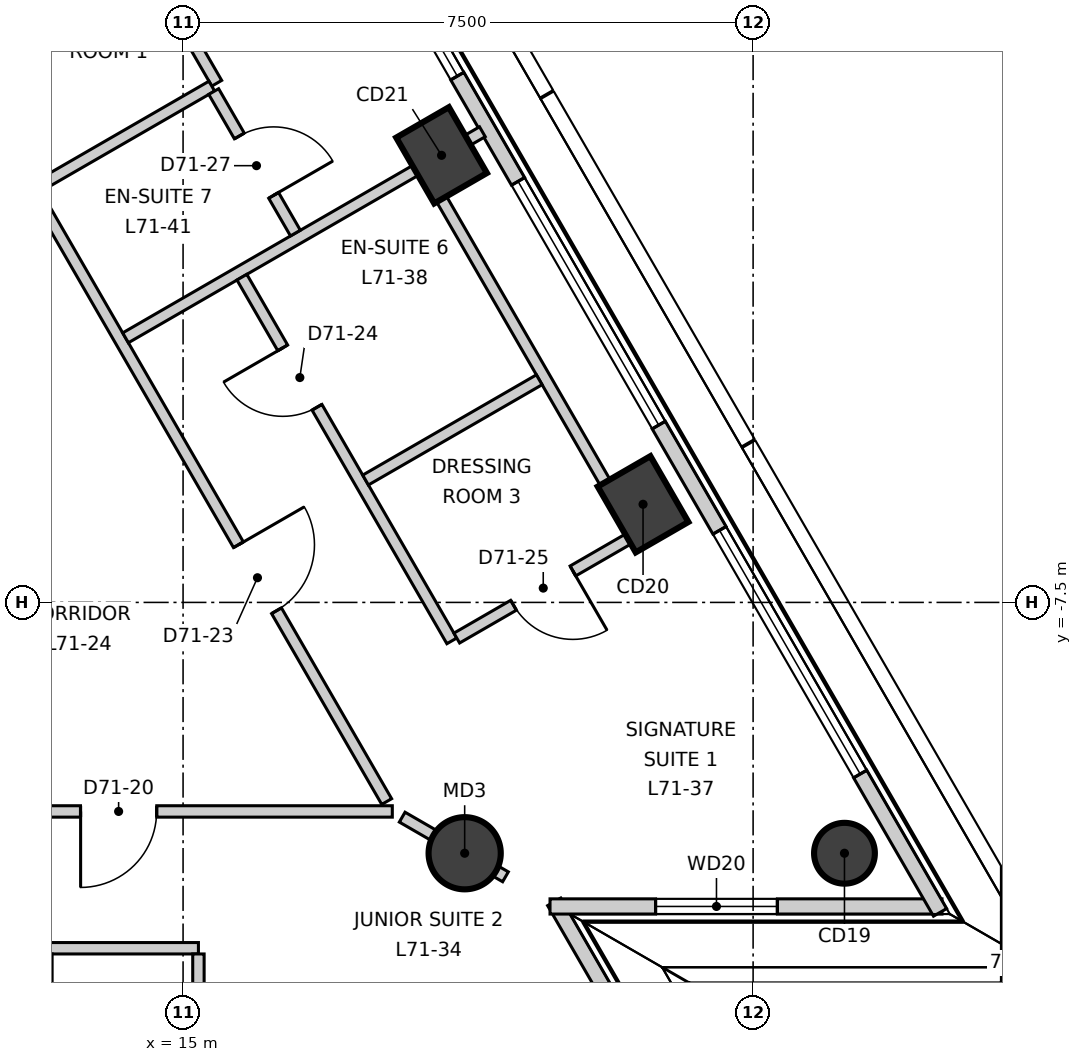
"""IFC4 building model, lengths in metres.
Left out: names, types, materials, properties, quantities, classifications, styles, units other than length and angle.
Written with IfcOpenShell. Run it as: python <this file> out.ifc"""

import sys

from ifc_helpers import new_model, si_unit, direction, frame, frame_2d, origin, origin_2d, place, context, subcontext, project, spatial, rectangle, circle, extrude, element, fill, save


model = new_model("IFC4")
c1 = context("Model", 3, precision=1e-05, world=origin(), true_north=direction((0.0, 1.0)))
c2 = subcontext(c1, "Body", "Model", "MODEL_VIEW")
j1 = project(units=[si_unit("LENGTHUNIT", "METRE"), si_unit("PLANEANGLEUNIT", "RADIAN")], contexts=[c1])
p1 = place(None, origin())
s1 = spatial("IfcSite", under=j1, at=p1, CompositionType="ELEMENT")
p2 = place(p1, origin())
s2 = spatial("IfcBuilding", under=s1, at=p2, CompositionType="ELEMENT")
p3 = place(p2, frame((0.0, 0.0, 300.7)))
s3 = spatial("IfcBuildingStorey", under=s2, at=p3, CompositionType="ELEMENT", Elevation=300.7)
p4 = place(p3, frame((23.702, -10.8, -0.3), z_axis=(0.0, 0.0, 1.0), x_axis=(-0.5, 0.866025403784, 0.0)))
e1 = element("IfcColumn", 1, at=p4, inside=s3, PredefinedType="COLUMN", context=c2, shape_type="SweptSolid", body=[
    extrude(circle(Radius=0.4, at=origin_2d()), origin(), (0.0, 0.0, 1.0), 3.6),
])
for number, where, z_axis, x_axis in (
    (2, (21.052, -6.209, -0.3), (0.0, 0.0, 1.0), (-0.5, 0.866, 0.0)),
    (3, (18.401, -1.618, -0.3), (0.0, 0.0, 1.0), (-0.5, 0.866, 0.0)),
):
    element("IfcColumn", number, at=place(p3, frame(where, z_axis=z_axis, x_axis=x_axis)), inside=s3, PredefinedType="COLUMN", context=c2, shape_type="SweptSolid", body=[
        extrude(rectangle(XDim=1.0, YDim=0.8, at=origin_2d()), origin(), (0.0, 0.0, 1.0), 3.6),
    ])
p5 = place(p3, frame((18.705, -10.8, -0.3), z_axis=(0.0, 0.0, 1.0), x_axis=(1.0, 0.0, 0.0)))
e4 = element("IfcColumn", 4, at=p5, inside=s3, PredefinedType="COLUMN", context=c2, shape_type="SweptSolid", body=[
    extrude(circle(Radius=0.475, at=origin_2d()), origin(), (0.0, 0.0, 1.0), 3.6),
])
p6 = place(p3, frame((22.462, -15.905, 0.0), z_axis=(0.0, 0.0, 1.0), x_axis=(-0.500054376048, 0.865994007483, 0.0)))
e5 = element("IfcWall", 5, at=p6, inside=s3, PredefinedType="ELEMENTEDWALL", context=c2, shape_type="SweptSolid", body=[
    extrude(rectangle(XDim=5.157, YDim=0.2, at=frame_2d((2.579, 0.0))), origin(), (0.0, 0.0, 1.0), 3.3),
])
p7 = place(p6, frame((1.99, 0.0, 0.9)))
e6 = element("IfcOpeningElement", 6, at=p7, cuts=e5, PredefinedType="OPENING", context=c2, shape_type="SweptSolid", body=[
    extrude(rectangle(XDim=1.6, YDim=2.2, at=frame_2d((0.8, 1.1))), frame((0.0, 0.11, 0.0), z_axis=(0.0, -1.0, 0.0), x_axis=(1.0, 0.0, 0.0)), (0.0, 0.0, 1.0), 0.22),
])
p8 = place(p3, frame((19.828, -11.5, 0.0), z_axis=(0.0, 0.0, 1.0), x_axis=(1.0, 0.0, 0.0)))
e7 = element("IfcWall", 7, at=p8, inside=s3, PredefinedType="ELEMENTEDWALL", context=c2, shape_type="SweptSolid", body=[
    extrude(rectangle(XDim=5.157, YDim=0.2, at=frame_2d((2.579, 0.0))), origin(), (0.0, 0.0, 1.0), 3.3),
])
p9 = place(p8, frame((1.39, 0.0, 0.9)))
e8 = element("IfcOpeningElement", 8, at=p9, cuts=e7, PredefinedType="OPENING", context=c2, shape_type="SweptSolid", body=[
    extrude(rectangle(XDim=1.6, YDim=2.2, at=frame_2d((0.8, 1.1))), frame((0.0, 0.11, 0.0), z_axis=(0.0, -1.0, 0.0), x_axis=(1.0, 0.0, 0.0)), (0.0, 0.0, 1.0), 0.22),
])
p10 = place(p3, frame((24.96, -11.578, 0.0), z_axis=(0.0, 0.0, 1.0), x_axis=(-0.500002391419, 0.866024023094, 0.0)))
e9 = element("IfcWall", 9, at=p10, inside=s3, PredefinedType="ELEMENTEDWALL", context=c2, shape_type="SweptSolid", body=[
    extrude(rectangle(XDim=44.994, YDim=0.2, at=frame_2d((22.497, 0.0))), origin(), (0.0, 0.0, 1.0), 3.3),
])
p11 = place(p10, frame((2.103, 0.0, 0.9)))
e10 = element("IfcOpeningElement", 10, at=p11, cuts=e9, PredefinedType="OPENING", context=c2, shape_type="SweptSolid", body=[
    extrude(rectangle(XDim=3.7, YDim=2.2, at=frame_2d((1.85, 1.1))), frame((0.0, 0.11, 0.0), z_axis=(0.0, -1.0, 0.0), x_axis=(1.0, 0.0, 0.0)), (0.0, 0.0, 1.0), 0.22),
])
p12 = place(p10, frame((7.404, 0.0, 0.9)))
e11 = element("IfcOpeningElement", 11, at=p12, cuts=e9, PredefinedType="OPENING", context=c2, shape_type="SweptSolid", body=[
    extrude(rectangle(XDim=3.7, YDim=2.2, at=frame_2d((1.85, 1.1))), frame((0.0, 0.11, 0.0), z_axis=(0.0, -1.0, 0.0), x_axis=(1.0, 0.0, 0.0)), (0.0, 0.0, 1.0), 0.22),
])
p13 = place(p10, frame((12.705, 0.0, 0.9)))
e12 = element("IfcOpeningElement", 12, at=p13, cuts=e9, PredefinedType="OPENING", context=c2, shape_type="SweptSolid", body=[
    extrude(rectangle(XDim=3.7, YDim=2.2, at=frame_2d((1.85, 1.1))), frame((0.0, 0.11, 0.0), z_axis=(0.0, -1.0, 0.0), x_axis=(1.0, 0.0, 0.0)), (0.0, 0.0, 1.0), 0.22),
])
p14 = place(p10, frame((18.006, 0.0, 0.9)))
e13 = element("IfcOpeningElement", 13, at=p14, cuts=e9, PredefinedType="OPENING", context=c2, shape_type="SweptSolid", body=[
    extrude(rectangle(XDim=3.7, YDim=2.2, at=frame_2d((1.85, 1.1))), frame((0.0, 0.11, 0.0), z_axis=(0.0, -1.0, 0.0), x_axis=(1.0, 0.0, 0.0)), (0.0, 0.0, 1.0), 0.22),
])
p15 = place(p10, frame((23.308, 0.0, 0.9)))
e14 = element("IfcOpeningElement", 14, at=p15, cuts=e9, PredefinedType="OPENING", context=c2, shape_type="SweptSolid", body=[
    extrude(rectangle(XDim=3.7, YDim=2.2, at=frame_2d((1.85, 1.1))), frame((0.0, 0.11, 0.0), z_axis=(0.0, -1.0, 0.0), x_axis=(1.0, 0.0, 0.0)), (0.0, 0.0, 1.0), 0.22),
])
p16 = place(p10, frame((28.609, 0.0, 0.9)))
e15 = element("IfcOpeningElement", 15, at=p16, cuts=e9, PredefinedType="OPENING", context=c2, shape_type="SweptSolid", body=[
    extrude(rectangle(XDim=3.7, YDim=2.2, at=frame_2d((1.85, 1.1))), frame((0.0, 0.11, 0.0), z_axis=(0.0, -1.0, 0.0), x_axis=(1.0, 0.0, 0.0)), (0.0, 0.0, 1.0), 0.22),
])
p17 = place(p10, frame((33.91, 0.0, 0.9)))
e16 = element("IfcOpeningElement", 16, at=p17, cuts=e9, PredefinedType="OPENING", context=c2, shape_type="SweptSolid", body=[
    extrude(rectangle(XDim=3.7, YDim=2.2, at=frame_2d((1.85, 1.1))), frame((0.0, 0.11, 0.0), z_axis=(0.0, -1.0, 0.0), x_axis=(1.0, 0.0, 0.0)), (0.0, 0.0, 1.0), 0.22),
])
p18 = place(p10, frame((39.211, 0.0, 0.9)))
e17 = element("IfcOpeningElement", 17, at=p18, cuts=e9, PredefinedType="OPENING", context=c2, shape_type="SweptSolid", body=[
    extrude(rectangle(XDim=3.7, YDim=2.2, at=frame_2d((1.85, 1.1))), frame((0.0, 0.11, 0.0), z_axis=(0.0, -1.0, 0.0), x_axis=(1.0, 0.0, 0.0)), (0.0, 0.0, 1.0), 0.22),
])
p19 = place(p3, frame((-17.603, -10.25, 0.0), z_axis=(0.0, 0.0, 1.0), x_axis=(1.0, 0.0, 0.0)))
e18 = element("IfcWall", 18, at=p19, inside=s3, PredefinedType="PARTITIONING", context=c2, shape_type="SweptSolid", body=[
    extrude(rectangle(XDim=35.356, YDim=0.15, at=frame_2d((17.678, 0.0))), origin(), (0.0, 0.0, 1.0), 3.3),
])
p20 = place(p19, frame((2.9, 0.0, 0.0)))
e19 = element("IfcOpeningElement", 19, at=p20, cuts=e18, PredefinedType="OPENING", context=c2, shape_type="SweptSolid", body=[
    extrude(rectangle(XDim=1.0, YDim=2.1, at=frame_2d((0.5, 1.05))), frame((0.0, 0.085, 0.0), z_axis=(0.0, -1.0, 0.0), x_axis=(1.0, 0.0, 0.0)), (0.0, 0.0, 1.0), 0.17),
])
p21 = place(p19, frame((10.351, 0.0, 0.0)))
e20 = element("IfcOpeningElement", 20, at=p21, cuts=e18, PredefinedType="OPENING", context=c2, shape_type="SweptSolid", body=[
    extrude(rectangle(XDim=1.0, YDim=2.1, at=frame_2d((0.5, 1.05))), frame((0.0, 0.085, 0.0), z_axis=(0.0, -1.0, 0.0), x_axis=(1.0, 0.0, 0.0)), (0.0, 0.0, 1.0), 0.17),
])
p22 = place(p19, frame((15.652, 0.0, 0.0)))
e21 = element("IfcOpeningElement", 21, at=p22, cuts=e18, PredefinedType="OPENING", context=c2, shape_type="SweptSolid", body=[
    extrude(rectangle(XDim=1.0, YDim=2.1, at=frame_2d((0.5, 1.05))), frame((0.0, 0.085, 0.0), z_axis=(0.0, -1.0, 0.0), x_axis=(1.0, 0.0, 0.0)), (0.0, 0.0, 1.0), 0.17),
])
p23 = place(p19, frame((24.753, 0.0, 0.0)))
e22 = element("IfcOpeningElement", 22, at=p23, cuts=e18, PredefinedType="OPENING", context=c2, shape_type="SweptSolid", body=[
    extrude(rectangle(XDim=1.0, YDim=2.1, at=frame_2d((0.5, 1.05))), frame((0.0, 0.085, 0.0), z_axis=(0.0, -1.0, 0.0), x_axis=(1.0, 0.0, 0.0)), (0.0, 0.0, 1.0), 0.17),
])
p24 = place(p19, frame((31.255, 0.0, 0.0)))
e23 = element("IfcOpeningElement", 23, at=p24, cuts=e18, PredefinedType="OPENING", context=c2, shape_type="SweptSolid", body=[
    extrude(rectangle(XDim=1.0, YDim=2.1, at=frame_2d((0.5, 1.05))), frame((0.0, 0.085, 0.0), z_axis=(0.0, -1.0, 0.0), x_axis=(1.0, 0.0, 0.0)), (0.0, 0.0, 1.0), 0.17),
])
p25 = place(p3, frame((17.883, -10.325, 0.0), z_axis=(0.0, 0.0, 1.0), x_axis=(0.865859083376, -0.500287964811, 0.0)))
e24 = element("IfcWall", 24, at=p25, inside=s3, PredefinedType="PARTITIONING", context=c2, shape_type="SweptSolid", body=[
    extrude(rectangle(XDim=1.569, YDim=0.15, at=frame_2d((0.785, 0.0))), origin(), (0.0, 0.0, 1.0), 2.8),
])
p26 = place(p3, frame((0.075, 20.37, 0.0), z_axis=(0.0, 0.0, 1.0), x_axis=(0.500009775255, -0.866019759965, 0.0)))
e25 = element("IfcWall", 25, at=p26, inside=s3, PredefinedType="PARTITIONING", context=c2, shape_type="SweptSolid", body=[
    extrude(rectangle(XDim=35.207, YDim=0.15, at=frame_2d((17.604, 0.0))), origin(), (0.0, 0.0, 1.0), 3.3),
])
p27 = place(p26, frame((31.307, 0.0, 0.0)))
e26 = element("IfcOpeningElement", 26, at=p27, cuts=e25, PredefinedType="OPENING", context=c2, shape_type="SweptSolid", body=[
    extrude(rectangle(XDim=1.0, YDim=2.1, at=frame_2d((0.5, 1.05))), frame((0.0, 0.085, 0.0), z_axis=(0.0, -1.0, 0.0), x_axis=(1.0, 0.0, 0.0)), (0.0, 0.0, 1.0), 0.17),
])
p28 = place(p26, frame((20.355, 0.0, 0.0)))
e27 = element("IfcOpeningElement", 27, at=p28, cuts=e25, PredefinedType="OPENING", context=c2, shape_type="SweptSolid", body=[
    extrude(rectangle(XDim=1.0, YDim=2.1, at=frame_2d((0.5, 1.05))), frame((0.0, 0.085, 0.0), z_axis=(0.0, -1.0, 0.0), x_axis=(1.0, 0.0, 0.0)), (0.0, 0.0, 1.0), 0.17),
])
p29 = place(p26, frame((24.355, 0.0, 0.0)))
e28 = element("IfcOpeningElement", 28, at=p29, cuts=e25, PredefinedType="OPENING", context=c2, shape_type="SweptSolid", body=[
    extrude(rectangle(XDim=0.9, YDim=2.1, at=frame_2d((0.45, 1.05))), frame((0.0, 0.085, 0.0), z_axis=(0.0, -1.0, 0.0), x_axis=(1.0, 0.0, 0.0)), (0.0, 0.0, 1.0), 0.17),
])
p30 = place(p26, frame((22.255, 0.0, 0.0)))
e29 = element("IfcOpeningElement", 29, at=p30, cuts=e25, PredefinedType="OPENING", context=c2, shape_type="SweptSolid", body=[
    extrude(rectangle(XDim=0.9, YDim=2.1, at=frame_2d((0.45, 1.05))), frame((0.0, 0.085, 0.0), z_axis=(0.0, -1.0, 0.0), x_axis=(1.0, 0.0, 0.0)), (0.0, 0.0, 1.0), 0.17),
])
p31 = place(p26, frame((8.453, 0.0, 0.0)))
e30 = element("IfcOpeningElement", 30, at=p31, cuts=e25, PredefinedType="OPENING", context=c2, shape_type="SweptSolid", body=[
    extrude(rectangle(XDim=1.0, YDim=2.1, at=frame_2d((0.5, 1.05))), frame((0.0, 0.085, 0.0), z_axis=(0.0, -1.0, 0.0), x_axis=(1.0, 0.0, 0.0)), (0.0, 0.0, 1.0), 0.17),
])
p32 = place(p26, frame((13.753, 0.0, 0.0)))
e31 = element("IfcOpeningElement", 31, at=p32, cuts=e25, PredefinedType="OPENING", context=c2, shape_type="SweptSolid", body=[
    extrude(rectangle(XDim=0.9, YDim=2.1, at=frame_2d((0.45, 1.05))), frame((0.0, 0.085, 0.0), z_axis=(0.0, -1.0, 0.0), x_axis=(1.0, 0.0, 0.0)), (0.0, 0.0, 1.0), 0.17),
])
p33 = place(p26, frame((11.553, 0.0, 0.0)))
e32 = element("IfcOpeningElement", 32, at=p33, cuts=e25, PredefinedType="OPENING", context=c2, shape_type="SweptSolid", body=[
    extrude(rectangle(XDim=0.9, YDim=2.1, at=frame_2d((0.45, 1.05))), frame((0.0, 0.085, 0.0), z_axis=(0.0, -1.0, 0.0), x_axis=(1.0, 0.0, 0.0)), (0.0, 0.0, 1.0), 0.17),
])
p34 = place(p26, frame((2.951, 0.0, 0.0)))
e33 = element("IfcOpeningElement", 33, at=p34, cuts=e25, PredefinedType="OPENING", context=c2, shape_type="SweptSolid", body=[
    extrude(rectangle(XDim=1.0, YDim=2.1, at=frame_2d((0.5, 1.05))), frame((0.0, 0.085, 0.0), z_axis=(0.0, -1.0, 0.0), x_axis=(1.0, 0.0, 0.0)), (0.0, 0.0, 1.0), 0.17),
])
p35 = place(p3, frame((14.343, 1.235, 0.0), z_axis=(0.0, 0.0, 1.0), x_axis=(0.500077893725, -0.86598042715, 0.0)))
e34 = element("IfcWall", 34, at=p35, inside=s3, PredefinedType="PARTITIONING", context=c2, shape_type="SweptSolid", body=[
    extrude(rectangle(XDim=2.2, YDim=0.15, at=frame_2d((1.1, 0.0))), origin(), (0.0, 0.0, 1.0), 3.3),
])
p36 = place(p3, frame((13.093, -2.027, 0.0), z_axis=(0.0, 0.0, 1.0), x_axis=(0.866042279195, 0.499970769793, 0.0)))
e35 = element("IfcWall", 35, at=p36, inside=s3, PredefinedType="PARTITIONING", context=c2, shape_type="SweptSolid", body=[
    extrude(rectangle(XDim=2.638, YDim=0.15, at=frame_2d((1.319, 0.0))), origin(), (0.0, 0.0, 1.0), 3.3),
])
p37 = place(p3, frame((14.243, -4.019, 0.0), z_axis=(0.0, 0.0, 1.0), x_axis=(0.866006352826, 0.500032995777, 0.0)))
e36 = element("IfcWall", 36, at=p37, inside=s3, PredefinedType="PARTITIONING", context=c2, shape_type="SweptSolid", body=[
    extrude(rectangle(XDim=5.422, YDim=0.15, at=frame_2d((2.711, 0.0))), origin(), (0.0, 0.0, 1.0), 3.3),
])
p38 = place(p3, frame((10.677, -12.05, 0.0), z_axis=(0.0, 0.0, 1.0), x_axis=(1.0, 0.0, 0.0)))
e37 = element("IfcWall", 37, at=p38, inside=s3, PredefinedType="PARTITIONING", context=c2, shape_type="SweptSolid", body=[
    extrude(rectangle(XDim=4.525, YDim=0.15, at=frame_2d((2.262, 0.0))), origin(), (0.0, 0.0, 1.0), 3.3),
])
p39 = place(p38, frame((0.775, 0.0, 0.0)))
e38 = element("IfcOpeningElement", 38, at=p39, cuts=e37, PredefinedType="OPENING", context=c2, shape_type="SweptSolid", body=[
    extrude(rectangle(XDim=0.9, YDim=2.1, at=frame_2d((0.45, 1.05))), frame((0.0, 0.085, 0.0), z_axis=(0.0, -1.0, 0.0), x_axis=(1.0, 0.0, 0.0)), (0.0, 0.0, 1.0), 0.17),
])
p40 = place(p3, frame((18.189, -1.827, 0.0), z_axis=(0.0, 0.0, 1.0), x_axis=(0.499898410332, -0.866084048662, 0.0)))
e39 = element("IfcWall", 39, at=p40, inside=s3, PredefinedType="PARTITIONING", context=c2, shape_type="SweptSolid", body=[
    extrude(rectangle(XDim=5.525, YDim=0.15, at=frame_2d((2.763, 0.0))), origin(), (0.0, 0.0, 1.0), 2.6),
])
p41 = place(p3, frame((15.774, -3.221, 0.0), z_axis=(0.0, 0.0, 1.0), x_axis=(0.499898410332, -0.866084048662, 0.0)))
e40 = element("IfcWall", 40, at=p41, inside=s3, PredefinedType="PARTITIONING", context=c2, shape_type="SweptSolid", body=[
    extrude(rectangle(XDim=5.525, YDim=0.15, at=frame_2d((2.763, 0.0))), origin(), (0.0, 0.0, 1.0), 3.3),
])
p42 = place(p41, frame((1.075, 0.0, 0.0)))
e41 = element("IfcOpeningElement", 41, at=p42, cuts=e40, PredefinedType="OPENING", context=c2, shape_type="SweptSolid", body=[
    extrude(rectangle(XDim=0.9, YDim=2.1, at=frame_2d((0.45, 1.05))), frame((0.0, 0.085, 0.0), z_axis=(0.0, -1.0, 0.0), x_axis=(1.0, 0.0, 0.0)), (0.0, 0.0, 1.0), 0.17),
])
p43 = place(p3, frame((15.403, -0.779, 0.0), z_axis=(0.0, 0.0, 1.0), x_axis=(0.499961633463, -0.866047553582, 0.0)))
e42 = element("IfcWall", 42, at=p43, inside=s3, PredefinedType="PARTITIONING", context=c2, shape_type="SweptSolid", body=[
    extrude(rectangle(XDim=2.15, YDim=0.15, at=frame_2d((1.075, 0.0))), origin(), (0.0, 0.0, 1.0), 3.3),
])
p44 = place(p43, frame((0.676, 0.0, 0.0)))
e43 = element("IfcOpeningElement", 43, at=p44, cuts=e42, PredefinedType="OPENING", context=c2, shape_type="SweptSolid", body=[
    extrude(rectangle(XDim=0.9, YDim=2.1, at=frame_2d((0.45, 1.05))), frame((0.0, 0.085, 0.0), z_axis=(0.0, -1.0, 0.0), x_axis=(1.0, 0.0, 0.0)), (0.0, 0.0, 1.0), 0.17),
])
p45 = place(p3, frame((15.202, -14.575, 0.0), z_axis=(0.0, 0.0, 1.0), x_axis=(0.0, 1.0, 0.0)))
e44 = element("IfcWall", 44, at=p45, inside=s3, PredefinedType="PARTITIONING", context=c2, shape_type="SweptSolid", body=[
    extrude(rectangle(XDim=2.45, YDim=0.15, at=frame_2d((1.225, 0.0))), origin(), (0.0, 0.0, 1.0), 3.3),
])
p46 = place(p45, frame((0.775, 0.0, 0.0)))
e45 = element("IfcOpeningElement", 45, at=p46, cuts=e44, PredefinedType="OPENING", context=c2, shape_type="SweptSolid", body=[
    extrude(rectangle(XDim=0.9, YDim=2.1, at=frame_2d((0.45, 1.05))), frame((0.0, 0.085, 0.0), z_axis=(0.0, -1.0, 0.0), x_axis=(1.0, 0.0, 0.0)), (0.0, 0.0, 1.0), 0.17),
])
p47 = place(p3, frame((17.401, -5.89, 0.0), z_axis=(0.0, 0.0, 1.0), x_axis=(0.866105468975, 0.499861297372, 0.0)))
e46 = element("IfcWall", 46, at=p47, inside=s3, PredefinedType="PARTITIONING", context=c2, shape_type="SweptSolid", body=[
    extrude(rectangle(XDim=2.638, YDim=0.15, at=frame_2d((1.319, 0.0))), origin(), (0.0, 0.0, 1.0), 3.3),
])
p48 = place(p3, frame((18.601, -7.969, 0.0), z_axis=(0.0, 0.0, 1.0), x_axis=(0.865881993967, 0.500248310865, 0.0)))
e47 = element("IfcWall", 47, at=p48, inside=s3, PredefinedType="PARTITIONING", context=c2, shape_type="SweptSolid", body=[
    extrude(rectangle(XDim=2.639, YDim=0.15, at=frame_2d((1.319, 0.0))), origin(), (0.0, 0.0, 1.0), 3.3),
])
p49 = place(p48, frame((0.864, 0.0, 0.0)))
e48 = element("IfcOpeningElement", 48, at=p49, cuts=e47, PredefinedType="OPENING", context=c2, shape_type="SweptSolid", body=[
    extrude(rectangle(XDim=0.9, YDim=2.1, at=frame_2d((0.45, 1.05))), frame((0.0, 0.085, 0.0), z_axis=(0.0, -1.0, 0.0), x_axis=(1.0, 0.0, 0.0)), (0.0, 0.0, 1.0), 0.17),
])
p50 = place(p9, origin())
e49 = element("IfcWindow", 49, at=p50, inside=s3, PartitioningType="SINGLE_PANEL", PredefinedType="WINDOW", context=c2, shape_type="SweptSolid", body=[
    extrude(rectangle(XDim=1.6, YDim=2.2, at=frame_2d((0.8, 1.1))), frame((0.0, 0.03, 0.0), z_axis=(0.0, -1.0, 0.0), x_axis=(1.0, 0.0, 0.0)), (0.0, 0.0, 1.0), 0.06),
])
fill(e8, e49)
p51 = place(p11, origin())
e50 = element("IfcWindow", 50, at=p51, inside=s3, PartitioningType="SINGLE_PANEL", PredefinedType="WINDOW", context=c2, shape_type="SweptSolid", body=[
    extrude(rectangle(XDim=3.7, YDim=2.2, at=frame_2d((1.85, 1.1))), frame((0.0, 0.03, 0.0), z_axis=(0.0, -1.0, 0.0), x_axis=(1.0, 0.0, 0.0)), (0.0, 0.0, 1.0), 0.06),
])
fill(e10, e50)
p52 = place(p12, origin())
e51 = element("IfcWindow", 51, at=p52, inside=s3, PartitioningType="SINGLE_PANEL", PredefinedType="WINDOW", context=c2, shape_type="SweptSolid", body=[
    extrude(rectangle(XDim=3.7, YDim=2.2, at=frame_2d((1.85, 1.1))), frame((0.0, 0.03, 0.0), z_axis=(0.0, -1.0, 0.0), x_axis=(1.0, 0.0, 0.0)), (0.0, 0.0, 1.0), 0.06),
])
fill(e11, e51)
p53 = place(p13, origin())
e52 = element("IfcWindow", 52, at=p53, inside=s3, PartitioningType="SINGLE_PANEL", PredefinedType="WINDOW", context=c2, shape_type="SweptSolid", body=[
    extrude(rectangle(XDim=3.7, YDim=2.2, at=frame_2d((1.85, 1.1))), frame((0.0, 0.03, 0.0), z_axis=(0.0, -1.0, 0.0), x_axis=(1.0, 0.0, 0.0)), (0.0, 0.0, 1.0), 0.06),
])
fill(e12, e52)
p54 = place(p24, origin())
e53 = element("IfcDoor", 53, at=p54, inside=s3, OperationType="SINGLE_SWING_LEFT", PredefinedType="DOOR", context=c2, shape_type="SweptSolid", body=[
    extrude(rectangle(XDim=1.0, YDim=2.1, at=frame_2d((0.5, 1.05))), frame((0.0, 0.025, 0.0), z_axis=(0.0, -1.0, 0.0), x_axis=(1.0, 0.0, 0.0)), (0.0, 0.0, 1.0), 0.05),
])
fill(e23, e53)
p55 = place(p27, origin())
e54 = element("IfcDoor", 54, at=p55, inside=s3, OperationType="SINGLE_SWING_RIGHT", PredefinedType="DOOR", context=c2, shape_type="SweptSolid", body=[
    extrude(rectangle(XDim=1.0, YDim=2.1, at=frame_2d((0.5, 1.05))), frame((0.0, 0.025, 0.0), z_axis=(0.0, -1.0, 0.0), x_axis=(1.0, 0.0, 0.0)), (0.0, 0.0, 1.0), 0.05),
])
fill(e26, e54)
p56 = place(p42, origin())
e55 = element("IfcDoor", 55, at=p56, inside=s3, OperationType="SINGLE_SWING_LEFT", PredefinedType="DOOR", context=c2, shape_type="SweptSolid", body=[
    extrude(rectangle(XDim=0.9, YDim=2.1, at=frame_2d((0.45, 1.05))), frame((0.0, 0.025, 0.0), z_axis=(0.0, -1.0, 0.0), x_axis=(1.0, 0.0, 0.0)), (0.0, 0.0, 1.0), 0.05),
])
fill(e41, e55)
p57 = place(p49, origin())
e56 = element("IfcDoor", 56, at=p57, inside=s3, OperationType="SINGLE_SWING_RIGHT", PredefinedType="DOOR", context=c2, shape_type="SweptSolid", body=[
    extrude(rectangle(XDim=0.9, YDim=2.1, at=frame_2d((0.45, 1.05))), frame((0.0, 0.025, 0.0), z_axis=(0.0, -1.0, 0.0), x_axis=(1.0, 0.0, 0.0)), (0.0, 0.0, 1.0), 0.05),
])
fill(e48, e56)
p58 = place(p44, origin())
e57 = element("IfcDoor", 57, at=p58, inside=s3, OperationType="SINGLE_SWING_LEFT", PredefinedType="DOOR", context=c2, shape_type="SweptSolid", body=[
    extrude(rectangle(XDim=0.9, YDim=2.1, at=frame_2d((0.45, 1.05))), frame((0.0, 0.025, 0.0), z_axis=(0.0, -1.0, 0.0), x_axis=(1.0, 0.0, 0.0)), (0.0, 0.0, 1.0), 0.05),
])
fill(e43, e57)
save(model, sys.argv[1])
